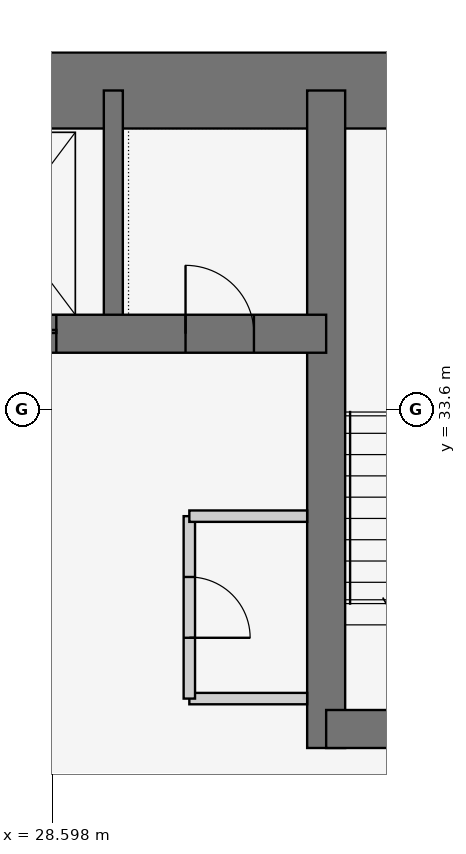
"""IFC4 building model, lengths in metres.
Left out: names, types, materials, properties, quantities, classifications, styles, units other than length and angle.
Written with IfcOpenShell. Run it as: python <this file> out.ifc"""

import sys

from ifc_helpers import new_model, si_unit, direction, frame, frame_2d, origin, place, context, subcontext, project, spatial, rectangle, extrude, element, fill, save


model = new_model("IFC4")
c1 = context("Model", 3, precision=1e-05, world=origin(), true_north=direction((0.0, 1.0)))
c2 = subcontext(c1, "Body", "Model", "MODEL_VIEW")
j1 = project(units=[si_unit("LENGTHUNIT", "METRE"), si_unit("PLANEANGLEUNIT", "RADIAN")], contexts=[c1])
p1 = place(None, origin())
s1 = spatial("IfcSite", under=j1, at=p1, CompositionType="ELEMENT")
p2 = place(p1, origin())
s2 = spatial("IfcBuilding", under=s1, at=p2, CompositionType="ELEMENT")
p3 = place(p2, frame((0.0, 0.0, 38.1)))
s3 = spatial("IfcBuildingStorey", under=s2, at=p3, CompositionType="ELEMENT", Elevation=38.1)
p4 = place(p3, frame((37.8, 37.8, 0.0), z_axis=(0.0, 0.0, 1.0), x_axis=(-1.0, 0.0, 0.0)))
e1 = element("IfcWall", 1, at=p4, inside=s3, PredefinedType="SHEAR", context=c2, shape_type="SweptSolid", body=[
    extrude(rectangle(XDim=17.3, YDim=1.0, at=frame_2d((8.65, 0.0))), origin(), (0.0, 0.0, 1.0), 3.6),
])
p5 = place(p3, frame((21.0, 34.6, 0.0), z_axis=(0.0, 0.0, 1.0), x_axis=(1.0, 0.0, 0.0)))
e2 = element("IfcWall", 2, at=p5, inside=s3, PredefinedType="SHEAR", context=c2, shape_type="SweptSolid", body=[
    extrude(rectangle(XDim=11.2, YDim=0.5, at=frame_2d((5.6, 0.0))), origin(), (0.0, 0.0, 1.0), 3.6),
])
p6 = place(p5, frame((9.35, 0.0, 0.0)))
e3 = element("IfcOpeningElement", 3, at=p6, cuts=e2, PredefinedType="OPENING", context=c2, shape_type="SweptSolid", body=[
    extrude(rectangle(XDim=0.9, YDim=2.1, at=frame_2d((0.45, 1.05))), frame((0.0, 0.26, 0.0), z_axis=(0.0, -1.0, 0.0), x_axis=(1.0, 0.0, 0.0)), (0.0, 0.0, 1.0), 0.52),
])
p7 = place(p5, frame((1.0, 0.0, 0.0)))
e4 = element("IfcOpeningElement", 4, at=p7, cuts=e2, PredefinedType="OPENING", context=c2, shape_type="SweptSolid", body=[
    extrude(rectangle(XDim=1.1, YDim=2.1, at=frame_2d((0.55, 1.05))), frame((0.0, 0.26, 0.0), z_axis=(0.0, -1.0, 0.0), x_axis=(1.0, 0.0, 0.0)), (0.0, 0.0, 1.0), 0.52),
])
p8 = place(p5, frame((3.65, 0.0, 0.0)))
e5 = element("IfcOpeningElement", 5, at=p8, cuts=e2, PredefinedType="OPENING", context=c2, shape_type="SweptSolid", body=[
    extrude(rectangle(XDim=1.1, YDim=2.1, at=frame_2d((0.55, 1.05))), frame((0.0, 0.26, 0.0), z_axis=(0.0, -1.0, 0.0), x_axis=(1.0, 0.0, 0.0)), (0.0, 0.0, 1.0), 0.52),
])
p9 = place(p5, frame((6.35, 0.0, 0.0)))
e6 = element("IfcOpeningElement", 6, at=p9, cuts=e2, PredefinedType="OPENING", context=c2, shape_type="SweptSolid", body=[
    extrude(rectangle(XDim=1.3, YDim=2.1, at=frame_2d((0.65, 1.05))), frame((0.0, 0.26, 0.0), z_axis=(0.0, -1.0, 0.0), x_axis=(1.0, 0.0, 0.0)), (0.0, 0.0, 1.0), 0.52),
])
p10 = place(p3, frame((32.2, 29.15, 0.0), z_axis=(0.0, 0.0, 1.0), x_axis=(0.0, 1.0, 0.0)))
e7 = element("IfcWall", 7, at=p10, inside=s3, PredefinedType="SHEAR", context=c2, shape_type="SweptSolid", body=[
    extrude(rectangle(XDim=8.65, YDim=0.5, at=frame_2d((4.325, 0.0))), origin(), (0.0, 0.0, 1.0), 3.6),
])
p11 = place(p3, frame((32.2, 29.4, 0.0), z_axis=(0.0, 0.0, 1.0), x_axis=(1.0, 0.0, 0.0)))
e8 = element("IfcWall", 8, at=p11, inside=s3, PredefinedType="SHEAR", context=c2, shape_type="SweptSolid", body=[
    extrude(rectangle(XDim=5.6, YDim=0.5, at=frame_2d((2.8, 0.0))), origin(), (0.0, 0.0, 1.0), 3.6),
])
p12 = place(p11, frame((2.0, 0.0, 0.0)))
e9 = element("IfcOpeningElement", 9, at=p12, cuts=e8, PredefinedType="OPENING", context=c2, shape_type="SweptSolid", body=[
    extrude(rectangle(XDim=1.2, YDim=2.1, at=frame_2d((0.6, 1.05))), frame((0.0, 0.26, 0.0), z_axis=(0.0, -1.0, 0.0), x_axis=(1.0, 0.0, 0.0)), (0.0, 0.0, 1.0), 0.52),
])
p13 = place(p3, frame((29.4, 34.6, 0.0), z_axis=(0.0, 0.0, 1.0), x_axis=(0.0, 1.0, 0.0)))
e10 = element("IfcWall", 10, at=p13, inside=s3, PredefinedType="SHEAR", context=c2, shape_type="SweptSolid", body=[
    extrude(rectangle(XDim=3.2, YDim=0.25, at=frame_2d((1.6, 0.0))), origin(), (0.0, 0.0, 1.0), 3.6),
])
p14 = place(p3, frame((31.95, 29.8, 0.0), z_axis=(0.0, 0.0, 1.0), x_axis=(-1.0, 0.0, 0.0)))
e11 = element("IfcWall", 11, at=p14, inside=s3, PredefinedType="PARTITIONING", context=c2, shape_type="SweptSolid", body=[
    extrude(rectangle(XDim=1.55, YDim=0.15, at=frame_2d((0.775, 0.0))), origin(), (0.0, 0.0, 1.0), 3.45),
])
p15 = place(p3, frame((30.4, 29.8, 0.0), z_axis=(0.0, 0.0, 1.0), x_axis=(0.0, 1.0, 0.0)))
e12 = element("IfcWall", 12, at=p15, inside=s3, PredefinedType="PARTITIONING", context=c2, shape_type="SweptSolid", body=[
    extrude(rectangle(XDim=2.4, YDim=0.15, at=frame_2d((1.2, 0.0))), origin(), (0.0, 0.0, 1.0), 3.45),
])
p16 = place(p15, frame((0.8, 0.0, 0.0)))
e13 = element("IfcOpeningElement", 13, at=p16, cuts=e12, PredefinedType="OPENING", context=c2, shape_type="SweptSolid", body=[
    extrude(rectangle(XDim=0.8, YDim=2.1, at=frame_2d((0.4, 1.05))), frame((0.0, 0.085, 0.0), z_axis=(0.0, -1.0, 0.0), x_axis=(1.0, 0.0, 0.0)), (0.0, 0.0, 1.0), 0.17),
])
p17 = place(p3, frame((30.4, 32.2, 0.0), z_axis=(0.0, 0.0, 1.0), x_axis=(1.0, 0.0, 0.0)))
e14 = element("IfcWall", 14, at=p17, inside=s3, PredefinedType="PARTITIONING", context=c2, shape_type="SweptSolid", body=[
    extrude(rectangle(XDim=1.55, YDim=0.15, at=frame_2d((0.775, 0.0))), origin(), (0.0, 0.0, 1.0), 3.45),
])
p18 = place(p6, origin())
e15 = element("IfcDoor", 15, at=p18, inside=s3, OperationType="SINGLE_SWING_LEFT", PredefinedType="DOOR", context=c2, shape_type="SweptSolid", body=[
    extrude(rectangle(XDim=0.9, YDim=2.1, at=frame_2d((0.45, 1.05))), frame((0.0, 0.025, 0.0), z_axis=(0.0, -1.0, 0.0), x_axis=(1.0, 0.0, 0.0)), (0.0, 0.0, 1.0), 0.05),
])
fill(e3, e15)
p19 = place(p16, frame((0.8, 0.0, 0.0), z_axis=(0.0, 0.0, 1.0), x_axis=(-1.0, 0.0, 0.0)))
e16 = element("IfcDoor", 16, at=p19, inside=s3, OperationType="SINGLE_SWING_RIGHT", PredefinedType="DOOR", context=c2, shape_type="SweptSolid", body=[
    extrude(rectangle(XDim=0.8, YDim=2.1, at=frame_2d((0.4, 1.05))), frame((0.0, 0.025, 0.0), z_axis=(0.0, -1.0, 0.0), x_axis=(1.0, 0.0, 0.0)), (0.0, 0.0, 1.0), 0.05),
])
fill(e13, e16)
p20 = place(p9, origin())
e17 = element("IfcDoor", 17, at=p20, inside=s3, OperationType="DOUBLE_DOOR_SLIDING", PredefinedType="DOOR", context=c2, shape_type="SweptSolid", body=[
    extrude(rectangle(XDim=1.3, YDim=2.1, at=frame_2d((0.65, 1.05))), frame((0.0, 0.025, 0.0), z_axis=(0.0, -1.0, 0.0), x_axis=(1.0, 0.0, 0.0)), (0.0, 0.0, 1.0), 0.05),
])
fill(e6, e17)
save(model, sys.argv[1])
